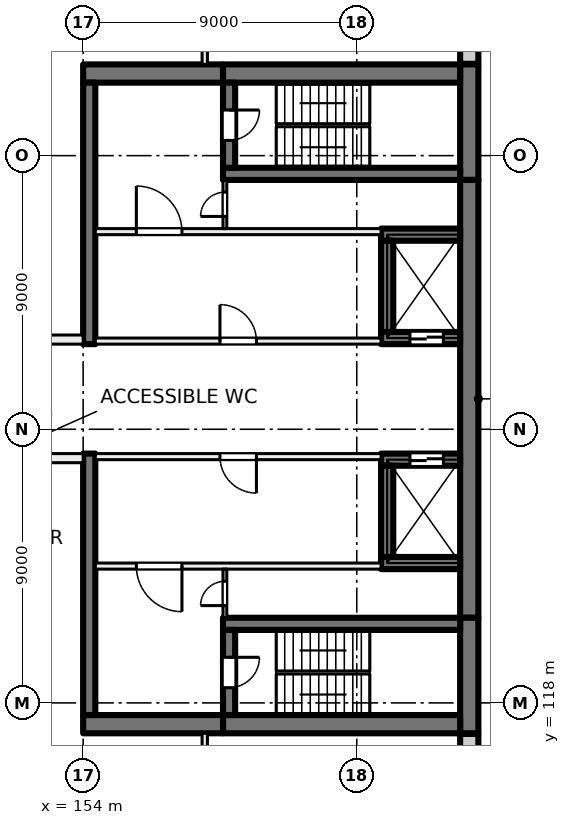
"""IFC4 building model, lengths in metres.
Left out: names, types, materials, properties, quantities, classifications, styles, units other than length and angle.
Written with IfcOpenShell. Run it as: python <this file> out.ifc"""

import sys

from ifc_helpers import new_model, si_unit, direction, frame, frame_2d, origin, place, context, subcontext, project, spatial, rectangle, extrude, element, fill, save


model = new_model("IFC4")
c1 = context("Model", 3, precision=1e-05, world=origin(), true_north=direction((0.0, 1.0)))
c2 = subcontext(c1, "Body", "Model", "MODEL_VIEW")
j1 = project(units=[si_unit("LENGTHUNIT", "METRE"), si_unit("PLANEANGLEUNIT", "RADIAN")], contexts=[c1])
p1 = place(None, origin())
s1 = spatial("IfcSite", under=j1, at=p1, CompositionType="ELEMENT")
p2 = place(p1, origin())
s2 = spatial("IfcBuilding", under=s1, at=p2, CompositionType="ELEMENT")
p3 = place(p2, frame((0.0, 0.0, 81.0)))
s3 = spatial("IfcBuildingStorey", under=s2, at=p3, CompositionType="ELEMENT", Elevation=81.0)
p4 = place(p3, frame((166.7, 139.0, 0.0), z_axis=(0.0, 0.0, 1.0), x_axis=(0.0, -1.0, 0.0)))
e1 = element("IfcWall", 1, at=p4, inside=s3, PredefinedType="SHEAR", context=c2, shape_type="SweptSolid", body=[
    extrude(rectangle(XDim=3.8, YDim=0.6, at=frame_2d((1.9, 0.0))), origin(), (0.0, 0.0, 1.0), 4.0),
])
p5 = place(p3, frame((166.7, 135.2, 0.0), z_axis=(0.0, 0.0, 1.0), x_axis=(0.0, -1.0, 0.0)))
e2 = element("IfcWall", 2, at=p5, inside=s3, PredefinedType="SHEAR", context=c2, shape_type="SweptSolid", body=[
    extrude(rectangle(XDim=14.4, YDim=0.6, at=frame_2d((7.2, 0.0))), origin(), (0.0, 0.0, 1.0), 4.0),
])
p6 = place(p3, frame((166.7, 120.8, 0.0), z_axis=(0.0, 0.0, 1.0), x_axis=(0.0, -1.0, 0.0)))
e3 = element("IfcWall", 3, at=p6, inside=s3, PredefinedType="SHEAR", context=c2, shape_type="SweptSolid", body=[
    extrude(rectangle(XDim=3.8, YDim=0.6, at=frame_2d((1.9, 0.0))), origin(), (0.0, 0.0, 1.0), 4.0),
])
for number, where, z_axis, x_axis in (
    (4, (166.4, 138.7, 0.0), (0.0, 0.0, 1.0), (-1.0, 0.0, 0.0)),
    (5, (166.4, 117.3, 0.0), (0.0, 0.0, 1.0), (-1.0, 0.0, 0.0)),
):
    element("IfcWall", number, at=place(p3, frame(where, z_axis=z_axis, x_axis=x_axis)), inside=s3, PredefinedType="SHEAR", context=c2, shape_type="SweptSolid", body=[
        extrude(rectangle(XDim=7.8, YDim=0.6, at=frame_2d((3.9, 0.0))), origin(), (0.0, 0.0, 1.0), 4.0),
    ])
for number, where, z_axis, x_axis in (
    (6, (158.6, 138.7, 0.0), (0.0, 0.0, 1.0), (-1.0, 0.0, 0.0)),
    (7, (158.6, 117.3, 0.0), (0.0, 0.0, 1.0), (-1.0, 0.0, 0.0)),
):
    element("IfcWall", number, at=place(p3, frame(where, z_axis=z_axis, x_axis=x_axis)), inside=s3, PredefinedType="SHEAR", context=c2, shape_type="SweptSolid", body=[
        extrude(rectangle(XDim=4.6, YDim=0.6, at=frame_2d((2.3, 0.0))), origin(), (0.0, 0.0, 1.0), 4.0),
    ])
p7 = place(p3, frame((166.4, 135.4, 0.0), z_axis=(0.0, 0.0, 1.0), x_axis=(-1.0, 0.0, 0.0)))
e8 = element("IfcWall", 8, at=p7, inside=s3, PredefinedType="SHEAR", context=c2, shape_type="SweptSolid", body=[
    extrude(rectangle(XDim=7.8, YDim=0.4, at=frame_2d((3.9, 0.0))), origin(), (0.0, 0.0, 1.0), 4.0),
])
p8 = place(p3, frame((158.8, 138.4, 0.0), z_axis=(0.0, 0.0, 1.0), x_axis=(0.0, -1.0, 0.0)))
e9 = element("IfcWall", 9, at=p8, inside=s3, PredefinedType="SHEAR", context=c2, shape_type="SweptSolid", body=[
    extrude(rectangle(XDim=2.8, YDim=0.4, at=frame_2d((1.4, 0.0))), origin(), (0.0, 0.0, 1.0), 4.0),
])
p9 = place(p8, frame((0.9, 0.0, 0.0)))
e10 = element("IfcOpeningElement", 10, at=p9, cuts=e9, PredefinedType="OPENING", context=c2, shape_type="SweptSolid", body=[
    extrude(rectangle(XDim=1.0, YDim=2.1, at=frame_2d((0.5, 1.05))), frame((0.0, 0.21, 0.0), z_axis=(0.0, -1.0, 0.0), x_axis=(1.0, 0.0, 0.0)), (0.0, 0.0, 1.0), 0.42),
])
p10 = place(p3, frame((166.4, 120.6, 0.0), z_axis=(0.0, 0.0, 1.0), x_axis=(-1.0, 0.0, 0.0)))
e11 = element("IfcWall", 11, at=p10, inside=s3, PredefinedType="SHEAR", context=c2, shape_type="SweptSolid", body=[
    extrude(rectangle(XDim=7.8, YDim=0.4, at=frame_2d((3.9, 0.0))), origin(), (0.0, 0.0, 1.0), 4.0),
])
p11 = place(p3, frame((158.8, 120.4, 0.0), z_axis=(0.0, 0.0, 1.0), x_axis=(0.0, -1.0, 0.0)))
e12 = element("IfcWall", 12, at=p11, inside=s3, PredefinedType="SHEAR", context=c2, shape_type="SweptSolid", body=[
    extrude(rectangle(XDim=2.8, YDim=0.4, at=frame_2d((1.4, 0.0))), origin(), (0.0, 0.0, 1.0), 4.0),
])
p12 = place(p11, frame((0.9, 0.0, 0.0)))
e13 = element("IfcOpeningElement", 13, at=p12, cuts=e12, PredefinedType="OPENING", context=c2, shape_type="SweptSolid", body=[
    extrude(rectangle(XDim=1.0, YDim=2.1, at=frame_2d((0.5, 1.05))), frame((0.0, 0.21, 0.0), z_axis=(0.0, -1.0, 0.0), x_axis=(1.0, 0.0, 0.0)), (0.0, 0.0, 1.0), 0.42),
])
p13 = place(p3, frame((166.4, 130.0, 0.0), z_axis=(0.0, 0.0, 1.0), x_axis=(-1.0, 0.0, 0.0)))
e14 = element("IfcWall", 14, at=p13, inside=s3, PredefinedType="SHEAR", context=c2, shape_type="SweptSolid", body=[
    extrude(rectangle(XDim=2.6, YDim=0.4, at=frame_2d((1.3, 0.0))), origin(), (0.0, 0.0, 1.0), 4.0),
])
p14 = place(p13, frame((0.55, 0.0, 0.0)))
e15 = element("IfcOpeningElement", 15, at=p14, cuts=e14, PredefinedType="OPENING", context=c2, shape_type="SweptSolid", body=[
    extrude(rectangle(XDim=1.1, YDim=2.1, at=frame_2d((0.55, 1.05))), frame((0.0, 0.21, 0.0), z_axis=(0.0, -1.0, 0.0), x_axis=(1.0, 0.0, 0.0)), (0.0, 0.0, 1.0), 0.42),
])
p15 = place(p3, frame((166.4, 133.4, 0.0), z_axis=(0.0, 0.0, 1.0), x_axis=(-1.0, 0.0, 0.0)))
e16 = element("IfcWall", 16, at=p15, inside=s3, PredefinedType="SHEAR", context=c2, shape_type="SweptSolid", body=[
    extrude(rectangle(XDim=2.6, YDim=0.4, at=frame_2d((1.3, 0.0))), origin(), (0.0, 0.0, 1.0), 4.0),
])
p16 = place(p3, frame((164.0, 133.2, 0.0), z_axis=(0.0, 0.0, 1.0), x_axis=(0.0, -1.0, 0.0)))
e17 = element("IfcWall", 17, at=p16, inside=s3, PredefinedType="SHEAR", context=c2, shape_type="SweptSolid", body=[
    extrude(rectangle(XDim=3.0, YDim=0.4, at=frame_2d((1.5, 0.0))), origin(), (0.0, 0.0, 1.0), 4.0),
])
p17 = place(p3, frame((166.4, 126.0, 0.0), z_axis=(0.0, 0.0, 1.0), x_axis=(-1.0, 0.0, 0.0)))
e18 = element("IfcWall", 18, at=p17, inside=s3, PredefinedType="SHEAR", context=c2, shape_type="SweptSolid", body=[
    extrude(rectangle(XDim=2.6, YDim=0.4, at=frame_2d((1.3, 0.0))), origin(), (0.0, 0.0, 1.0), 4.0),
])
p18 = place(p17, frame((0.55, 0.0, 0.0)))
e19 = element("IfcOpeningElement", 19, at=p18, cuts=e18, PredefinedType="OPENING", context=c2, shape_type="SweptSolid", body=[
    extrude(rectangle(XDim=1.1, YDim=2.1, at=frame_2d((0.55, 1.05))), frame((0.0, 0.21, 0.0), z_axis=(0.0, -1.0, 0.0), x_axis=(1.0, 0.0, 0.0)), (0.0, 0.0, 1.0), 0.42),
])
p19 = place(p3, frame((166.4, 122.6, 0.0), z_axis=(0.0, 0.0, 1.0), x_axis=(-1.0, 0.0, 0.0)))
e20 = element("IfcWall", 20, at=p19, inside=s3, PredefinedType="SHEAR", context=c2, shape_type="SweptSolid", body=[
    extrude(rectangle(XDim=2.6, YDim=0.4, at=frame_2d((1.3, 0.0))), origin(), (0.0, 0.0, 1.0), 4.0),
])
p20 = place(p3, frame((164.0, 125.8, 0.0), z_axis=(0.0, 0.0, 1.0), x_axis=(0.0, -1.0, 0.0)))
e21 = element("IfcWall", 21, at=p20, inside=s3, PredefinedType="SHEAR", context=c2, shape_type="SweptSolid", body=[
    extrude(rectangle(XDim=3.0, YDim=0.4, at=frame_2d((1.5, 0.0))), origin(), (0.0, 0.0, 1.0), 4.0),
])
for number, where, z_axis, x_axis in (
    (22, (154.2, 138.4, 0.0), (0.0, 0.0, 1.0), (0.0, -1.0, 0.0)),
    (23, (154.2, 126.2, 0.0), (0.0, 0.0, 1.0), (0.0, -1.0, 0.0)),
):
    element("IfcWall", number, at=place(p3, frame(where, z_axis=z_axis, x_axis=x_axis)), inside=s3, PredefinedType="SHEAR", context=c2, shape_type="SweptSolid", body=[
        extrude(rectangle(XDim=8.6, YDim=0.4, at=frame_2d((4.3, 0.0))), origin(), (0.0, 0.0, 1.0), 4.0),
    ])
p21 = place(p3, frame((166.7, 116.98, 0.0), z_axis=(0.0, 0.0, 1.0), x_axis=(0.0, -1.0, 0.0)))
e24 = element("IfcWall", 24, at=p21, inside=s3, PredefinedType="SOLIDWALL", context=c2, shape_type="SweptSolid", body=[
    extrude(rectangle(XDim=2.98, YDim=0.6, at=frame_2d((1.49, 0.0))), origin(), (0.0, 0.0, 1.0), 3.625),
])
p22 = place(p3, frame((166.7, 141.93, 0.0), z_axis=(0.0, 0.0, 1.0), x_axis=(0.0, -1.0, 0.0)))
e25 = element("IfcWall", 25, at=p22, inside=s3, PredefinedType="SOLIDWALL", context=c2, shape_type="SweptSolid", body=[
    extrude(rectangle(XDim=2.91, YDim=0.6, at=frame_2d((1.455, 0.0))), origin(), (0.0, 0.0, 1.0), 3.625),
])
p23 = place(p3, frame((163.8, 126.1, 0.0), z_axis=(0.0, 0.0, 1.0), x_axis=(-1.0, 0.0, 0.0)))
e26 = element("IfcWall", 26, at=p23, inside=s3, PredefinedType="PARTITIONING", context=c2, shape_type="SweptSolid", body=[
    extrude(rectangle(XDim=9.4, YDim=0.2, at=frame_2d((4.7, 0.0))), origin(), (0.0, 0.0, 1.0), 3.625),
])
p24 = place(p23, frame((4.1, 0.0, 0.0)))
e27 = element("IfcOpeningElement", 27, at=p24, cuts=e26, PredefinedType="OPENING", context=c2, shape_type="SweptSolid", body=[
    extrude(rectangle(XDim=1.2, YDim=2.1, at=frame_2d((0.6, 1.05))), frame((0.0, 0.11, 0.0), z_axis=(0.0, -1.0, 0.0), x_axis=(1.0, 0.0, 0.0)), (0.0, 0.0, 1.0), 0.22),
])
p25 = place(p3, frame((163.8, 122.5, 0.0), z_axis=(0.0, 0.0, 1.0), x_axis=(-1.0, 0.0, 0.0)))
e28 = element("IfcWall", 28, at=p25, inside=s3, PredefinedType="PARTITIONING", context=c2, shape_type="SweptSolid", body=[
    extrude(rectangle(XDim=9.4, YDim=0.2, at=frame_2d((4.7, 0.0))), origin(), (0.0, 0.0, 1.0), 3.625),
])
p26 = place(p25, frame((6.55, 0.0, 0.0)))
e29 = element("IfcOpeningElement", 29, at=p26, cuts=e28, PredefinedType="OPENING", context=c2, shape_type="SweptSolid", body=[
    extrude(rectangle(XDim=1.5, YDim=2.1, at=frame_2d((0.75, 1.05))), frame((0.0, 0.11, 0.0), z_axis=(0.0, -1.0, 0.0), x_axis=(1.0, 0.0, 0.0)), (0.0, 0.0, 1.0), 0.22),
])
p27 = place(p3, frame((158.663, 120.8, 0.0), z_axis=(0.0, 0.0, 1.0), x_axis=(0.0, 1.0, 0.0)))
e30 = element("IfcWall", 30, at=p27, inside=s3, PredefinedType="PARTITIONING", context=c2, shape_type="SweptSolid", body=[
    extrude(rectangle(XDim=1.6, YDim=0.125, at=frame_2d((0.8, 0.0))), origin(), (0.0, 0.0, 1.0), 3.625),
])
p28 = place(p27, frame((0.4, 0.0, 0.0)))
e31 = element("IfcOpeningElement", 31, at=p28, cuts=e30, PredefinedType="OPENING", context=c2, shape_type="SweptSolid", body=[
    extrude(rectangle(XDim=0.8, YDim=2.1, at=frame_2d((0.4, 1.05))), frame((0.0, 0.073, 0.0), z_axis=(0.0, -1.0, 0.0), x_axis=(1.0, 0.0, 0.0)), (0.0, 0.0, 1.0), 0.145),
])
p29 = place(p3, frame((154.4, 129.9, 0.0), z_axis=(0.0, 0.0, 1.0), x_axis=(1.0, 0.0, 0.0)))
e32 = element("IfcWall", 32, at=p29, inside=s3, PredefinedType="PARTITIONING", context=c2, shape_type="SweptSolid", body=[
    extrude(rectangle(XDim=9.4, YDim=0.2, at=frame_2d((4.7, 0.0))), origin(), (0.0, 0.0, 1.0), 3.625),
])
p30 = place(p29, frame((4.1, 0.0, 0.0)))
e33 = element("IfcOpeningElement", 33, at=p30, cuts=e32, PredefinedType="OPENING", context=c2, shape_type="SweptSolid", body=[
    extrude(rectangle(XDim=1.2, YDim=2.1, at=frame_2d((0.6, 1.05))), frame((0.0, 0.11, 0.0), z_axis=(0.0, -1.0, 0.0), x_axis=(1.0, 0.0, 0.0)), (0.0, 0.0, 1.0), 0.22),
])
p31 = place(p3, frame((154.4, 133.5, 0.0), z_axis=(0.0, 0.0, 1.0), x_axis=(1.0, 0.0, 0.0)))
e34 = element("IfcWall", 34, at=p31, inside=s3, PredefinedType="PARTITIONING", context=c2, shape_type="SweptSolid", body=[
    extrude(rectangle(XDim=9.4, YDim=0.2, at=frame_2d((4.7, 0.0))), origin(), (0.0, 0.0, 1.0), 3.625),
])
p32 = place(p31, frame((1.35, 0.0, 0.0)))
e35 = element("IfcOpeningElement", 35, at=p32, cuts=e34, PredefinedType="OPENING", context=c2, shape_type="SweptSolid", body=[
    extrude(rectangle(XDim=1.5, YDim=2.1, at=frame_2d((0.75, 1.05))), frame((0.0, 0.11, 0.0), z_axis=(0.0, -1.0, 0.0), x_axis=(1.0, 0.0, 0.0)), (0.0, 0.0, 1.0), 0.22),
])
p33 = place(p3, frame((158.663, 133.6, 0.0), z_axis=(0.0, 0.0, 1.0), x_axis=(0.0, 1.0, 0.0)))
e36 = element("IfcWall", 36, at=p33, inside=s3, PredefinedType="PARTITIONING", context=c2, shape_type="SweptSolid", body=[
    extrude(rectangle(XDim=1.6, YDim=0.125, at=frame_2d((0.8, 0.0))), origin(), (0.0, 0.0, 1.0), 3.625),
])
p34 = place(p33, frame((0.4, 0.0, 0.0)))
e37 = element("IfcOpeningElement", 37, at=p34, cuts=e36, PredefinedType="OPENING", context=c2, shape_type="SweptSolid", body=[
    extrude(rectangle(XDim=0.8, YDim=2.1, at=frame_2d((0.4, 1.05))), frame((0.0, 0.073, 0.0), z_axis=(0.0, -1.0, 0.0), x_axis=(1.0, 0.0, 0.0)), (0.0, 0.0, 1.0), 0.145),
])
p35 = place(p3, frame((140.0, 129.95, 0.0), z_axis=(0.0, 0.0, 1.0), x_axis=(1.0, 0.0, 0.0)))
e38 = element("IfcWall", 38, at=p35, inside=s3, PredefinedType="PARTITIONING", context=c2, shape_type="SweptSolid", body=[
    extrude(rectangle(XDim=14.0, YDim=0.3, at=frame_2d((7.0, 0.0))), origin(), (0.0, 0.0, 1.0), 3.625),
])
p36 = place(p35, frame((6.1, 0.0, 0.0)))
e39 = element("IfcOpeningElement", 39, at=p36, cuts=e38, PredefinedType="OPENING", context=c2, shape_type="SweptSolid", body=[
    extrude(rectangle(XDim=1.8, YDim=2.1, at=frame_2d((0.9, 1.05))), frame((0.0, 0.16, 0.0), z_axis=(0.0, -1.0, 0.0), x_axis=(1.0, 0.0, 0.0)), (0.0, 0.0, 1.0), 0.32),
])
p37 = place(p3, frame((154.0, 126.05, 0.0), z_axis=(0.0, 0.0, 1.0), x_axis=(-1.0, 0.0, 0.0)))
e40 = element("IfcWall", 40, at=p37, inside=s3, PredefinedType="PARTITIONING", context=c2, shape_type="SweptSolid", body=[
    extrude(rectangle(XDim=14.0, YDim=0.3, at=frame_2d((7.0, 0.0))), origin(), (0.0, 0.0, 1.0), 3.625),
])
p38 = place(p37, frame((10.25, 0.0, 0.0)))
e41 = element("IfcOpeningElement", 41, at=p38, cuts=e40, PredefinedType="OPENING", context=c2, shape_type="SweptSolid", body=[
    extrude(rectangle(XDim=1.0, YDim=2.1, at=frame_2d((0.5, 1.05))), frame((0.0, 0.16, 0.0), z_axis=(0.0, -1.0, 0.0), x_axis=(1.0, 0.0, 0.0)), (0.0, 0.0, 1.0), 0.32),
])
p39 = place(p37, frame((1.6, 0.0, 0.0)))
e42 = element("IfcOpeningElement", 42, at=p39, cuts=e40, PredefinedType="OPENING", context=c2, shape_type="SweptSolid", body=[
    extrude(rectangle(XDim=1.8, YDim=2.1, at=frame_2d((0.9, 1.05))), frame((0.0, 0.16, 0.0), z_axis=(0.0, -1.0, 0.0), x_axis=(1.0, 0.0, 0.0)), (0.0, 0.0, 1.0), 0.32),
])
p40 = place(p3, frame((158.0, 110.6, 0.0), z_axis=(0.0, 0.0, 1.0), x_axis=(0.0, 1.0, 0.0)))
e43 = element("IfcWall", 43, at=p40, inside=s3, PredefinedType="PARTITIONING", context=c2, shape_type="SweptSolid", body=[
    extrude(rectangle(XDim=6.4, YDim=0.175, at=frame_2d((3.2, 0.0))), origin(), (0.0, 0.0, 1.0), 3.625),
])
p41 = place(p40, frame((2.6, 0.0, 0.0)))
e44 = element("IfcOpeningElement", 44, at=p41, cuts=e43, PredefinedType="OPENING", context=c2, shape_type="SweptSolid", body=[
    extrude(rectangle(XDim=1.2, YDim=2.1, at=frame_2d((0.6, 1.05))), frame((0.0, 0.097, 0.0), z_axis=(0.0, -1.0, 0.0), x_axis=(1.0, 0.0, 0.0)), (0.0, 0.0, 1.0), 0.195),
])
p42 = place(p3, frame((158.0, 139.0, 0.0), z_axis=(0.0, 0.0, 1.0), x_axis=(0.0, 1.0, 0.0)))
e45 = element("IfcWall", 45, at=p42, inside=s3, PredefinedType="PARTITIONING", context=c2, shape_type="SweptSolid", body=[
    extrude(rectangle(XDim=6.4, YDim=0.175, at=frame_2d((3.2, 0.0))), origin(), (0.0, 0.0, 1.0), 3.625),
])
p43 = place(p42, frame((2.6, 0.0, 0.0)))
e46 = element("IfcOpeningElement", 46, at=p43, cuts=e45, PredefinedType="OPENING", context=c2, shape_type="SweptSolid", body=[
    extrude(rectangle(XDim=1.2, YDim=2.1, at=frame_2d((0.6, 1.05))), frame((0.0, 0.097, 0.0), z_axis=(0.0, -1.0, 0.0), x_axis=(1.0, 0.0, 0.0)), (0.0, 0.0, 1.0), 0.195),
])
p44 = place(p18, origin())
e47 = element("IfcDoor", 47, at=p44, inside=s3, OperationType="DOUBLE_DOOR_SLIDING", PredefinedType="DOOR", context=c2, shape_type="SweptSolid", body=[
    extrude(rectangle(XDim=1.1, YDim=2.1, at=frame_2d((0.55, 1.05))), frame((0.0, 0.025, 0.0), z_axis=(0.0, -1.0, 0.0), x_axis=(1.0, 0.0, 0.0)), (0.0, 0.0, 1.0), 0.05),
])
fill(e19, e47)
p45 = place(p14, origin())
e48 = element("IfcDoor", 48, at=p45, inside=s3, OperationType="DOUBLE_DOOR_SLIDING", PredefinedType="DOOR", context=c2, shape_type="SweptSolid", body=[
    extrude(rectangle(XDim=1.1, YDim=2.1, at=frame_2d((0.55, 1.05))), frame((0.0, 0.025, 0.0), z_axis=(0.0, -1.0, 0.0), x_axis=(1.0, 0.0, 0.0)), (0.0, 0.0, 1.0), 0.05),
])
fill(e15, e48)
p46 = place(p24, origin())
e49 = element("IfcDoor", 49, at=p46, inside=s3, OperationType="DOUBLE_DOOR_SINGLE_SWING", PredefinedType="DOOR", context=c2, shape_type="SweptSolid", body=[
    extrude(rectangle(XDim=1.2, YDim=2.1, at=frame_2d((0.6, 1.05))), frame((0.0, 0.025, 0.0), z_axis=(0.0, -1.0, 0.0), x_axis=(1.0, 0.0, 0.0)), (0.0, 0.0, 1.0), 0.05),
])
fill(e27, e49)
p47 = place(p26, origin())
e50 = element("IfcDoor", 50, at=p47, inside=s3, OperationType="DOUBLE_DOOR_SINGLE_SWING", PredefinedType="DOOR", context=c2, shape_type="SweptSolid", body=[
    extrude(rectangle(XDim=1.5, YDim=2.1, at=frame_2d((0.75, 1.05))), frame((0.0, 0.025, 0.0), z_axis=(0.0, -1.0, 0.0), x_axis=(1.0, 0.0, 0.0)), (0.0, 0.0, 1.0), 0.05),
])
fill(e29, e50)
p48 = place(p12, origin())
e51 = element("IfcDoor", 51, at=p48, inside=s3, OperationType="SINGLE_SWING_LEFT", PredefinedType="DOOR", context=c2, shape_type="SweptSolid", body=[
    extrude(rectangle(XDim=1.0, YDim=2.1, at=frame_2d((0.5, 1.05))), frame((0.0, 0.025, 0.0), z_axis=(0.0, -1.0, 0.0), x_axis=(1.0, 0.0, 0.0)), (0.0, 0.0, 1.0), 0.05),
])
fill(e13, e51)
p49 = place(p28, origin())
e52 = element("IfcDoor", 52, at=p49, inside=s3, OperationType="SINGLE_SWING_RIGHT", PredefinedType="DOOR", context=c2, shape_type="SweptSolid", body=[
    extrude(rectangle(XDim=0.8, YDim=2.1, at=frame_2d((0.4, 1.05))), frame((0.0, 0.025, 0.0), z_axis=(0.0, -1.0, 0.0), x_axis=(1.0, 0.0, 0.0)), (0.0, 0.0, 1.0), 0.05),
])
fill(e31, e52)
p50 = place(p30, origin())
e53 = element("IfcDoor", 53, at=p50, inside=s3, OperationType="DOUBLE_DOOR_SINGLE_SWING", PredefinedType="DOOR", context=c2, shape_type="SweptSolid", body=[
    extrude(rectangle(XDim=1.2, YDim=2.1, at=frame_2d((0.6, 1.05))), frame((0.0, 0.025, 0.0), z_axis=(0.0, -1.0, 0.0), x_axis=(1.0, 0.0, 0.0)), (0.0, 0.0, 1.0), 0.05),
])
fill(e33, e53)
p51 = place(p32, origin())
e54 = element("IfcDoor", 54, at=p51, inside=s3, OperationType="DOUBLE_DOOR_SINGLE_SWING", PredefinedType="DOOR", context=c2, shape_type="SweptSolid", body=[
    extrude(rectangle(XDim=1.5, YDim=2.1, at=frame_2d((0.75, 1.05))), frame((0.0, 0.025, 0.0), z_axis=(0.0, -1.0, 0.0), x_axis=(1.0, 0.0, 0.0)), (0.0, 0.0, 1.0), 0.05),
])
fill(e35, e54)
p52 = place(p9, origin())
e55 = element("IfcDoor", 55, at=p52, inside=s3, OperationType="SINGLE_SWING_RIGHT", PredefinedType="DOOR", context=c2, shape_type="SweptSolid", body=[
    extrude(rectangle(XDim=1.0, YDim=2.1, at=frame_2d((0.5, 1.05))), frame((0.0, 0.025, 0.0), z_axis=(0.0, -1.0, 0.0), x_axis=(1.0, 0.0, 0.0)), (0.0, 0.0, 1.0), 0.05),
])
fill(e10, e55)
p53 = place(p34, origin())
e56 = element("IfcDoor", 56, at=p53, inside=s3, OperationType="SINGLE_SWING_LEFT", PredefinedType="DOOR", context=c2, shape_type="SweptSolid", body=[
    extrude(rectangle(XDim=0.8, YDim=2.1, at=frame_2d((0.4, 1.05))), frame((0.0, 0.025, 0.0), z_axis=(0.0, -1.0, 0.0), x_axis=(1.0, 0.0, 0.0)), (0.0, 0.0, 1.0), 0.05),
])
fill(e37, e56)
save(model, sys.argv[1])
